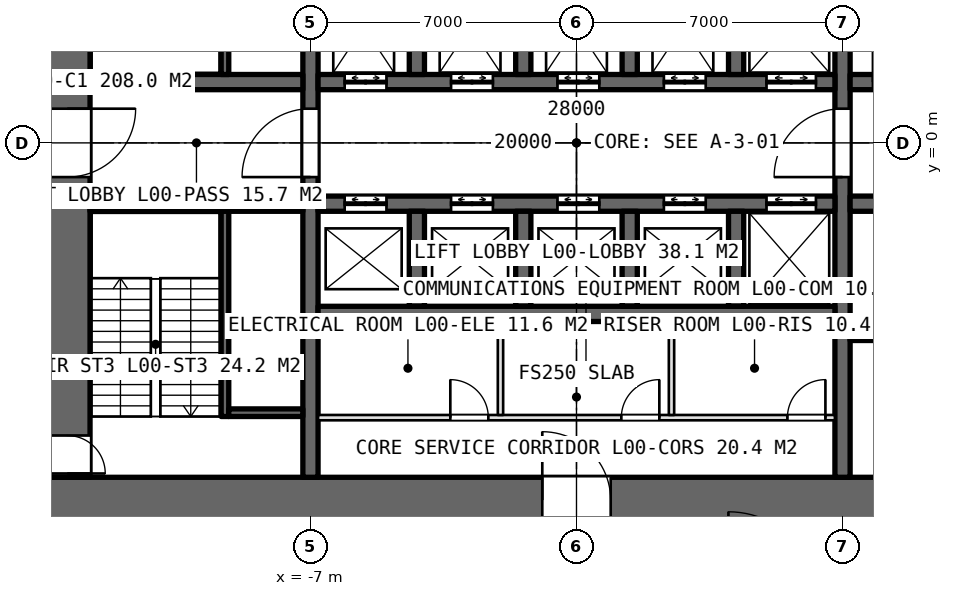
"""IFC4 building model, lengths in metres.
Left out: names, types, materials, properties, quantities, classifications, styles, units other than length and angle.
Written with IfcOpenShell. Run it as: python <this file> out.ifc"""

import sys

from ifc_helpers import new_model, si_unit, direction, frame, frame_2d, origin, place, context, subcontext, project, spatial, rectangle, extrude, element, fill, save


model = new_model("IFC4")
c1 = context("Model", 3, precision=1e-05, world=origin(), true_north=direction((0.0, 1.0)))
c2 = subcontext(c1, "Body", "Model", "MODEL_VIEW")
j1 = project(units=[si_unit("LENGTHUNIT", "METRE"), si_unit("PLANEANGLEUNIT", "RADIAN")], contexts=[c1])
p1 = place(None, origin())
s1 = spatial("IfcSite", under=j1, at=p1, CompositionType="ELEMENT")
p2 = place(p1, origin())
s2 = spatial("IfcBuilding", under=s1, at=p2, CompositionType="ELEMENT")
p3 = place(p2, origin())
s3 = spatial("IfcBuildingStorey", under=s2, at=p3, CompositionType="ELEMENT", Elevation=0.0)
p4 = place(p3, frame((-14.0, -9.4, -0.3), z_axis=(0.0, 0.0, 1.0), x_axis=(1.0, 0.0, 0.0)))
e1 = element("IfcWall", 1, at=p4, inside=s3, PredefinedType="SHEAR", context=c2, shape_type="SweptSolid", body=[
    extrude(rectangle(XDim=28.0, YDim=1.2, at=frame_2d((14.0, 0.0))), origin(), (0.0, 0.0, 1.0), 5.3),
])
p5 = place(p4, frame((13.1, 0.0, 0.3)))
e2 = element("IfcOpeningElement", 2, at=p5, cuts=e1, PredefinedType="OPENING", context=c2, shape_type="SweptSolid", body=[
    extrude(rectangle(XDim=1.8, YDim=2.4, at=frame_2d((0.9, 1.2))), frame((0.0, 0.61, 0.0), z_axis=(0.0, -1.0, 0.0), x_axis=(1.0, 0.0, 0.0)), (0.0, 0.0, 1.0), 1.22),
])
p6 = place(p4, frame((22.9, 0.0, 0.3)))
e3 = element("IfcOpeningElement", 3, at=p6, cuts=e1, PredefinedType="OPENING", context=c2, shape_type="SweptSolid", body=[
    extrude(rectangle(XDim=2.2, YDim=2.7, at=frame_2d((1.1, 1.35))), frame((0.0, 0.61, 0.0), z_axis=(0.0, -1.0, 0.0), x_axis=(1.0, 0.0, 0.0)), (0.0, 0.0, 1.0), 1.22),
])
p7 = place(p3, frame((-13.4, 8.8, -0.3), z_axis=(0.0, 0.0, 1.0), x_axis=(0.0, -1.0, 0.0)))
e4 = element("IfcWall", 4, at=p7, inside=s3, PredefinedType="SHEAR", context=c2, shape_type="SweptSolid", body=[
    extrude(rectangle(XDim=17.6, YDim=1.2, at=frame_2d((8.8, 0.0))), origin(), (0.0, 0.0, 1.0), 5.3),
])
p8 = place(p7, frame((7.9, 0.0, 0.3)))
e5 = element("IfcOpeningElement", 5, at=p8, cuts=e4, PredefinedType="OPENING", context=c2, shape_type="SweptSolid", body=[
    extrude(rectangle(XDim=1.8, YDim=2.4, at=frame_2d((0.9, 1.2))), frame((0.0, 0.61, 0.0), z_axis=(0.0, -1.0, 0.0), x_axis=(1.0, 0.0, 0.0)), (0.0, 0.0, 1.0), 1.22),
])
p9 = place(p7, frame((16.5, 0.0, 0.3)))
e6 = element("IfcOpeningElement", 6, at=p9, cuts=e4, PredefinedType="OPENING", context=c2, shape_type="SweptSolid", body=[
    extrude(rectangle(XDim=1.0, YDim=2.4, at=frame_2d((0.5, 1.2))), frame((0.0, 0.61, 0.0), z_axis=(0.0, -1.0, 0.0), x_axis=(1.0, 0.0, 0.0)), (0.0, 0.0, 1.0), 1.22),
])
p10 = place(p3, frame((-7.0, -8.8, -0.3), z_axis=(0.0, 0.0, 1.0), x_axis=(0.0, 1.0, 0.0)))
e7 = element("IfcWall", 7, at=p10, inside=s3, PredefinedType="SHEAR", context=c2, shape_type="SweptSolid", body=[
    extrude(rectangle(XDim=17.6, YDim=0.4, at=frame_2d((8.8, 0.0))), origin(), (0.0, 0.0, 1.0), 5.3),
])
p11 = place(p10, frame((7.9, 0.0, 0.3)))
e8 = element("IfcOpeningElement", 8, at=p11, cuts=e7, PredefinedType="OPENING", context=c2, shape_type="SweptSolid", body=[
    extrude(rectangle(XDim=1.8, YDim=2.4, at=frame_2d((0.9, 1.2))), frame((0.0, 0.21, 0.0), z_axis=(0.0, -1.0, 0.0), x_axis=(1.0, 0.0, 0.0)), (0.0, 0.0, 1.0), 0.42),
])
p12 = place(p3, frame((7.0, -8.8, -0.3), z_axis=(0.0, 0.0, 1.0), x_axis=(0.0, 1.0, 0.0)))
e9 = element("IfcWall", 9, at=p12, inside=s3, PredefinedType="SHEAR", context=c2, shape_type="SweptSolid", body=[
    extrude(rectangle(XDim=17.6, YDim=0.4, at=frame_2d((8.8, 0.0))), origin(), (0.0, 0.0, 1.0), 5.3),
])
p13 = place(p12, frame((7.9, 0.0, 0.3)))
e10 = element("IfcOpeningElement", 10, at=p13, cuts=e9, PredefinedType="OPENING", context=c2, shape_type="SweptSolid", body=[
    extrude(rectangle(XDim=1.8, YDim=2.4, at=frame_2d((0.9, 1.2))), frame((0.0, 0.21, 0.0), z_axis=(0.0, -1.0, 0.0), x_axis=(1.0, 0.0, 0.0)), (0.0, 0.0, 1.0), 0.42),
])
p14 = place(p3, frame((-6.8, 1.6, -0.3), z_axis=(0.0, 0.0, 1.0), x_axis=(1.0, 0.0, 0.0)))
e11 = element("IfcWall", 11, at=p14, inside=s3, PredefinedType="SHEAR", context=c2, shape_type="SweptSolid", body=[
    extrude(rectangle(XDim=13.6, YDim=0.4, at=frame_2d((6.8, 0.0))), origin(), (0.0, 0.0, 1.0), 5.3),
])
p15 = place(p14, frame((0.7, 0.0, 0.3)))
e12 = element("IfcOpeningElement", 12, at=p15, cuts=e11, PredefinedType="OPENING", context=c2, shape_type="SweptSolid", body=[
    extrude(rectangle(XDim=1.1, YDim=2.4, at=frame_2d((0.55, 1.2))), frame((0.0, 0.21, 0.0), z_axis=(0.0, -1.0, 0.0), x_axis=(1.0, 0.0, 0.0)), (0.0, 0.0, 1.0), 0.42),
])
p16 = place(p14, frame((3.5, 0.0, 0.3)))
e13 = element("IfcOpeningElement", 13, at=p16, cuts=e11, PredefinedType="OPENING", context=c2, shape_type="SweptSolid", body=[
    extrude(rectangle(XDim=1.1, YDim=2.4, at=frame_2d((0.55, 1.2))), frame((0.0, 0.21, 0.0), z_axis=(0.0, -1.0, 0.0), x_axis=(1.0, 0.0, 0.0)), (0.0, 0.0, 1.0), 0.42),
])
p17 = place(p14, frame((6.3, 0.0, 0.3)))
e14 = element("IfcOpeningElement", 14, at=p17, cuts=e11, PredefinedType="OPENING", context=c2, shape_type="SweptSolid", body=[
    extrude(rectangle(XDim=1.1, YDim=2.4, at=frame_2d((0.55, 1.2))), frame((0.0, 0.21, 0.0), z_axis=(0.0, -1.0, 0.0), x_axis=(1.0, 0.0, 0.0)), (0.0, 0.0, 1.0), 0.42),
])
p18 = place(p14, frame((9.1, 0.0, 0.3)))
e15 = element("IfcOpeningElement", 15, at=p18, cuts=e11, PredefinedType="OPENING", context=c2, shape_type="SweptSolid", body=[
    extrude(rectangle(XDim=1.1, YDim=2.4, at=frame_2d((0.55, 1.2))), frame((0.0, 0.21, 0.0), z_axis=(0.0, -1.0, 0.0), x_axis=(1.0, 0.0, 0.0)), (0.0, 0.0, 1.0), 0.42),
])
p19 = place(p14, frame((11.8, 0.0, 0.3)))
e16 = element("IfcOpeningElement", 16, at=p19, cuts=e11, PredefinedType="OPENING", context=c2, shape_type="SweptSolid", body=[
    extrude(rectangle(XDim=1.3, YDim=2.4, at=frame_2d((0.65, 1.2))), frame((0.0, 0.21, 0.0), z_axis=(0.0, -1.0, 0.0), x_axis=(1.0, 0.0, 0.0)), (0.0, 0.0, 1.0), 0.42),
])
p20 = place(p3, frame((-6.8, -1.6, -0.3), z_axis=(0.0, 0.0, 1.0), x_axis=(1.0, 0.0, 0.0)))
e17 = element("IfcWall", 17, at=p20, inside=s3, PredefinedType="SHEAR", context=c2, shape_type="SweptSolid", body=[
    extrude(rectangle(XDim=13.6, YDim=0.4, at=frame_2d((6.8, 0.0))), origin(), (0.0, 0.0, 1.0), 5.3),
])
p21 = place(p20, frame((0.7, 0.0, 0.3)))
e18 = element("IfcOpeningElement", 18, at=p21, cuts=e17, PredefinedType="OPENING", context=c2, shape_type="SweptSolid", body=[
    extrude(rectangle(XDim=1.1, YDim=2.4, at=frame_2d((0.55, 1.2))), frame((0.0, 0.21, 0.0), z_axis=(0.0, -1.0, 0.0), x_axis=(1.0, 0.0, 0.0)), (0.0, 0.0, 1.0), 0.42),
])
p22 = place(p20, frame((3.5, 0.0, 0.3)))
e19 = element("IfcOpeningElement", 19, at=p22, cuts=e17, PredefinedType="OPENING", context=c2, shape_type="SweptSolid", body=[
    extrude(rectangle(XDim=1.1, YDim=2.4, at=frame_2d((0.55, 1.2))), frame((0.0, 0.21, 0.0), z_axis=(0.0, -1.0, 0.0), x_axis=(1.0, 0.0, 0.0)), (0.0, 0.0, 1.0), 0.42),
])
p23 = place(p20, frame((6.3, 0.0, 0.3)))
e20 = element("IfcOpeningElement", 20, at=p23, cuts=e17, PredefinedType="OPENING", context=c2, shape_type="SweptSolid", body=[
    extrude(rectangle(XDim=1.1, YDim=2.4, at=frame_2d((0.55, 1.2))), frame((0.0, 0.21, 0.0), z_axis=(0.0, -1.0, 0.0), x_axis=(1.0, 0.0, 0.0)), (0.0, 0.0, 1.0), 0.42),
])
p24 = place(p20, frame((9.1, 0.0, 0.3)))
e21 = element("IfcOpeningElement", 21, at=p24, cuts=e17, PredefinedType="OPENING", context=c2, shape_type="SweptSolid", body=[
    extrude(rectangle(XDim=1.1, YDim=2.4, at=frame_2d((0.55, 1.2))), frame((0.0, 0.21, 0.0), z_axis=(0.0, -1.0, 0.0), x_axis=(1.0, 0.0, 0.0)), (0.0, 0.0, 1.0), 0.42),
])
p25 = place(p20, frame((11.8, 0.0, 0.3)))
e22 = element("IfcOpeningElement", 22, at=p25, cuts=e17, PredefinedType="OPENING", context=c2, shape_type="SweptSolid", body=[
    extrude(rectangle(XDim=1.3, YDim=2.4, at=frame_2d((0.65, 1.2))), frame((0.0, 0.21, 0.0), z_axis=(0.0, -1.0, 0.0), x_axis=(1.0, 0.0, 0.0)), (0.0, 0.0, 1.0), 0.42),
])
p26 = place(p3, frame((-6.8, -4.5, -0.3), z_axis=(0.0, 0.0, 1.0), x_axis=(1.0, 0.0, 0.0)))
e23 = element("IfcWall", 23, at=p26, inside=s3, PredefinedType="SHEAR", context=c2, shape_type="SweptSolid", body=[
    extrude(rectangle(XDim=13.6, YDim=0.4, at=frame_2d((6.8, 0.0))), origin(), (0.0, 0.0, 1.0), 5.3),
])
for number, where, z_axis, x_axis in (
    (24, (-12.8, 1.6, -0.3), (0.0, 0.0, 1.0), (1.0, 0.0, 0.0)),
    (25, (-12.8, -1.6, -0.3), (0.0, 0.0, 1.0), (1.0, 0.0, 0.0)),
):
    element("IfcWall", number, at=place(p3, frame(where, z_axis=z_axis, x_axis=x_axis)), inside=s3, PredefinedType="SHEAR", context=c2, shape_type="SweptSolid", body=[
        extrude(rectangle(XDim=5.6, YDim=0.4, at=frame_2d((2.8, 0.0))), origin(), (0.0, 0.0, 1.0), 5.3),
    ])
p27 = place(p3, frame((7.2, 1.6, -0.3), z_axis=(0.0, 0.0, 1.0), x_axis=(1.0, 0.0, 0.0)))
e26 = element("IfcWall", 26, at=p27, inside=s3, PredefinedType="SHEAR", context=c2, shape_type="SweptSolid", body=[
    extrude(rectangle(XDim=5.6, YDim=0.4, at=frame_2d((2.8, 0.0))), origin(), (0.0, 0.0, 1.0), 5.3),
])
p28 = place(p27, frame((0.6, 0.0, 0.3)))
e27 = element("IfcOpeningElement", 27, at=p28, cuts=e26, PredefinedType="OPENING", context=c2, shape_type="SweptSolid", body=[
    extrude(rectangle(XDim=1.0, YDim=2.4, at=frame_2d((0.5, 1.2))), frame((0.0, 0.21, 0.0), z_axis=(0.0, -1.0, 0.0), x_axis=(1.0, 0.0, 0.0)), (0.0, 0.0, 1.0), 0.42),
])
p29 = place(p3, frame((7.2, -1.6, -0.3), z_axis=(0.0, 0.0, 1.0), x_axis=(1.0, 0.0, 0.0)))
e28 = element("IfcWall", 28, at=p29, inside=s3, PredefinedType="SHEAR", context=c2, shape_type="SweptSolid", body=[
    extrude(rectangle(XDim=5.6, YDim=0.4, at=frame_2d((2.8, 0.0))), origin(), (0.0, 0.0, 1.0), 5.3),
])
p30 = place(p29, frame((0.9, 0.0, 0.3)))
e29 = element("IfcOpeningElement", 29, at=p30, cuts=e28, PredefinedType="OPENING", context=c2, shape_type="SweptSolid", body=[
    extrude(rectangle(XDim=1.3, YDim=2.4, at=frame_2d((0.65, 1.2))), frame((0.0, 0.21, 0.0), z_axis=(0.0, -1.0, 0.0), x_axis=(1.0, 0.0, 0.0)), (0.0, 0.0, 1.0), 0.42),
])
p31 = place(p29, frame((3.9, 0.0, 0.3)))
e30 = element("IfcOpeningElement", 30, at=p31, cuts=e28, PredefinedType="OPENING", context=c2, shape_type="SweptSolid", body=[
    extrude(rectangle(XDim=1.3, YDim=2.4, at=frame_2d((0.65, 1.2))), frame((0.0, 0.21, 0.0), z_axis=(0.0, -1.0, 0.0), x_axis=(1.0, 0.0, 0.0)), (0.0, 0.0, 1.0), 0.42),
])
p32 = place(p3, frame((7.2, -5.0, -0.3), z_axis=(0.0, 0.0, 1.0), x_axis=(1.0, 0.0, 0.0)))
e31 = element("IfcWall", 31, at=p32, inside=s3, PredefinedType="SHEAR", context=c2, shape_type="SweptSolid", body=[
    extrude(rectangle(XDim=5.6, YDim=0.4, at=frame_2d((2.8, 0.0))), origin(), (0.0, 0.0, 1.0), 5.3),
])
for number, where, z_axis, x_axis in (
    (32, (-4.2, 1.8, -0.3), (0.0, 0.0, 1.0), (0.0, 1.0, 0.0)),
    (33, (-4.2, -4.3, -0.3), (0.0, 0.0, 1.0), (0.0, 1.0, 0.0)),
    (34, (-1.4, 1.8, -0.3), (0.0, 0.0, 1.0), (0.0, 1.0, 0.0)),
    (35, (-1.4, -4.3, -0.3), (0.0, 0.0, 1.0), (0.0, 1.0, 0.0)),
    (36, (1.4, 1.8, -0.3), (0.0, 0.0, 1.0), (0.0, 1.0, 0.0)),
    (37, (1.4, -4.3, -0.3), (0.0, 0.0, 1.0), (0.0, 1.0, 0.0)),
    (38, (4.2, 1.8, -0.3), (0.0, 0.0, 1.0), (0.0, 1.0, 0.0)),
    (39, (4.2, -4.3, -0.3), (0.0, 0.0, 1.0), (0.0, 1.0, 0.0)),
):
    element("IfcWall", number, at=place(p3, frame(where, z_axis=z_axis, x_axis=x_axis)), inside=s3, PredefinedType="SHEAR", context=c2, shape_type="SweptSolid", body=[
        extrude(rectangle(XDim=2.5, YDim=0.4, at=frame_2d((1.25, 0.0))), origin(), (0.0, 0.0, 1.0), 5.3),
    ])
p33 = place(p3, frame((-6.8, -7.23, 0.0), z_axis=(0.0, 0.0, 1.0), x_axis=(1.0, 0.0, 0.0)))
e40 = element("IfcWall", 40, at=p33, inside=s3, PredefinedType="PARTITIONING", context=c2, shape_type="SweptSolid", body=[
    extrude(rectangle(XDim=13.6, YDim=0.14, at=frame_2d((6.8, 0.0))), origin(), (0.0, 0.0, 1.0), 4.75),
])
p34 = place(p33, frame((3.48, 0.0, 0.0)))
e41 = element("IfcOpeningElement", 41, at=p34, cuts=e40, PredefinedType="OPENING", context=c2, shape_type="SweptSolid", body=[
    extrude(rectangle(XDim=1.0, YDim=2.4, at=frame_2d((0.5, 1.2))), frame((0.0, 0.08, 0.0), z_axis=(0.0, -1.0, 0.0), x_axis=(1.0, 0.0, 0.0)), (0.0, 0.0, 1.0), 0.16),
])
p35 = place(p33, frame((7.98, 0.0, 0.0)))
e42 = element("IfcOpeningElement", 42, at=p35, cuts=e40, PredefinedType="OPENING", context=c2, shape_type="SweptSolid", body=[
    extrude(rectangle(XDim=1.0, YDim=2.4, at=frame_2d((0.5, 1.2))), frame((0.0, 0.08, 0.0), z_axis=(0.0, -1.0, 0.0), x_axis=(1.0, 0.0, 0.0)), (0.0, 0.0, 1.0), 0.16),
])
p36 = place(p33, frame((12.35, 0.0, 0.0)))
e43 = element("IfcOpeningElement", 43, at=p36, cuts=e40, PredefinedType="OPENING", context=c2, shape_type="SweptSolid", body=[
    extrude(rectangle(XDim=1.0, YDim=2.4, at=frame_2d((0.5, 1.2))), frame((0.0, 0.08, 0.0), z_axis=(0.0, -1.0, 0.0), x_axis=(1.0, 0.0, 0.0)), (0.0, 0.0, 1.0), 0.16),
])
for number, where, z_axis, x_axis in (
    (44, (-2.0, -4.7, 0.0), (0.0, 0.0, 1.0), (0.0, -1.0, 0.0)),
    (45, (2.5, -4.7, 0.0), (0.0, 0.0, 1.0), (0.0, -1.0, 0.0)),
):
    element("IfcWall", number, at=place(p3, frame(where, z_axis=z_axis, x_axis=x_axis)), inside=s3, PredefinedType="PARTITIONING", context=c2, shape_type="SweptSolid", body=[
        extrude(rectangle(XDim=2.46, YDim=0.14, at=frame_2d((1.23, 0.0))), origin(), (0.0, 0.0, 1.0), 4.75),
    ])
for number, where, z_axis, x_axis in (
    (46, (-9.25, 7.2, -0.3), (0.0, 0.0, 1.0), (0.0, -1.0, 0.0)),
    (47, (-9.25, -7.2, -0.3), (0.0, 0.0, 1.0), (0.0, 1.0, 0.0)),
):
    element("IfcWall", number, at=place(p3, frame(where, z_axis=z_axis, x_axis=x_axis)), inside=s3, PredefinedType="SOLIDWALL", context=c2, shape_type="SweptSolid", body=[
        extrude(rectangle(XDim=5.4, YDim=0.2, at=frame_2d((2.7, 0.0))), origin(), (0.0, 0.0, 1.0), 5.3),
    ])
p37 = place(p3, frame((-9.15, -7.1, -0.3), z_axis=(0.0, 0.0, 1.0), x_axis=(1.0, 0.0, 0.0)))
e48 = element("IfcWall", 48, at=p37, inside=s3, PredefinedType="SOLIDWALL", context=c2, shape_type="SweptSolid", body=[
    extrude(rectangle(XDim=1.95, YDim=0.2, at=frame_2d((0.975, 0.0))), origin(), (0.0, 0.0, 1.0), 5.3),
])
p38 = place(p8, origin())
e49 = element("IfcDoor", 49, at=p38, inside=s3, OperationType="DOUBLE_DOOR_SINGLE_SWING", PredefinedType="DOOR", context=c2, shape_type="SweptSolid", body=[
    extrude(rectangle(XDim=1.8, YDim=2.4, at=frame_2d((0.9, 1.2))), frame((0.0, 0.025, 0.0), z_axis=(0.0, -1.0, 0.0), x_axis=(1.0, 0.0, 0.0)), (0.0, 0.0, 1.0), 0.05),
])
fill(e5, e49)
p39 = place(p11, origin())
e50 = element("IfcDoor", 50, at=p39, inside=s3, OperationType="DOUBLE_DOOR_SINGLE_SWING", PredefinedType="DOOR", context=c2, shape_type="SweptSolid", body=[
    extrude(rectangle(XDim=1.8, YDim=2.4, at=frame_2d((0.9, 1.2))), frame((0.0, 0.025, 0.0), z_axis=(0.0, -1.0, 0.0), x_axis=(1.0, 0.0, 0.0)), (0.0, 0.0, 1.0), 0.05),
])
fill(e8, e50)
p40 = place(p13, origin())
e51 = element("IfcDoor", 51, at=p40, inside=s3, OperationType="DOUBLE_DOOR_SINGLE_SWING", PredefinedType="DOOR", context=c2, shape_type="SweptSolid", body=[
    extrude(rectangle(XDim=1.8, YDim=2.4, at=frame_2d((0.9, 1.2))), frame((0.0, 0.025, 0.0), z_axis=(0.0, -1.0, 0.0), x_axis=(1.0, 0.0, 0.0)), (0.0, 0.0, 1.0), 0.05),
])
fill(e10, e51)
p41 = place(p9, origin())
e52 = element("IfcDoor", 52, at=p41, inside=s3, OperationType="SINGLE_SWING_RIGHT", PredefinedType="DOOR", context=c2, shape_type="SweptSolid", body=[
    extrude(rectangle(XDim=1.0, YDim=2.4, at=frame_2d((0.5, 1.2))), frame((0.0, 0.025, 0.0), z_axis=(0.0, -1.0, 0.0), x_axis=(1.0, 0.0, 0.0)), (0.0, 0.0, 1.0), 0.05),
])
fill(e6, e52)
p42 = place(p34, origin())
e53 = element("IfcDoor", 53, at=p42, inside=s3, OperationType="SINGLE_SWING_LEFT", PredefinedType="DOOR", context=c2, shape_type="SweptSolid", body=[
    extrude(rectangle(XDim=1.0, YDim=2.4, at=frame_2d((0.5, 1.2))), frame((0.0, 0.025, 0.0), z_axis=(0.0, -1.0, 0.0), x_axis=(1.0, 0.0, 0.0)), (0.0, 0.0, 1.0), 0.05),
])
fill(e41, e53)
p43 = place(p35, origin())
e54 = element("IfcDoor", 54, at=p43, inside=s3, OperationType="SINGLE_SWING_RIGHT", PredefinedType="DOOR", context=c2, shape_type="SweptSolid", body=[
    extrude(rectangle(XDim=1.0, YDim=2.4, at=frame_2d((0.5, 1.2))), frame((0.0, 0.025, 0.0), z_axis=(0.0, -1.0, 0.0), x_axis=(1.0, 0.0, 0.0)), (0.0, 0.0, 1.0), 0.05),
])
fill(e42, e54)
p44 = place(p36, origin())
e55 = element("IfcDoor", 55, at=p44, inside=s3, OperationType="SINGLE_SWING_RIGHT", PredefinedType="DOOR", context=c2, shape_type="SweptSolid", body=[
    extrude(rectangle(XDim=1.0, YDim=2.4, at=frame_2d((0.5, 1.2))), frame((0.0, 0.025, 0.0), z_axis=(0.0, -1.0, 0.0), x_axis=(1.0, 0.0, 0.0)), (0.0, 0.0, 1.0), 0.05),
])
fill(e43, e55)
p45 = place(p5, origin())
e56 = element("IfcDoor", 56, at=p45, inside=s3, OperationType="DOUBLE_DOOR_SINGLE_SWING", PredefinedType="DOOR", context=c2, shape_type="SweptSolid", body=[
    extrude(rectangle(XDim=1.8, YDim=2.4, at=frame_2d((0.9, 1.2))), frame((0.0, 0.025, 0.0), z_axis=(0.0, -1.0, 0.0), x_axis=(1.0, 0.0, 0.0)), (0.0, 0.0, 1.0), 0.05),
])
fill(e2, e56)
p46 = place(p15, origin())
e57 = element("IfcDoor", 57, at=p46, inside=s3, OperationType="DOUBLE_DOOR_SLIDING", PredefinedType="DOOR", context=c2, shape_type="SweptSolid", body=[
    extrude(rectangle(XDim=1.1, YDim=2.4, at=frame_2d((0.55, 1.2))), frame((0.0, 0.025, 0.0), z_axis=(0.0, -1.0, 0.0), x_axis=(1.0, 0.0, 0.0)), (0.0, 0.0, 1.0), 0.05),
])
fill(e12, e57)
p47 = place(p21, origin())
e58 = element("IfcDoor", 58, at=p47, inside=s3, OperationType="DOUBLE_DOOR_SLIDING", PredefinedType="DOOR", context=c2, shape_type="SweptSolid", body=[
    extrude(rectangle(XDim=1.1, YDim=2.4, at=frame_2d((0.55, 1.2))), frame((0.0, 0.025, 0.0), z_axis=(0.0, -1.0, 0.0), x_axis=(1.0, 0.0, 0.0)), (0.0, 0.0, 1.0), 0.05),
])
fill(e18, e58)
p48 = place(p16, origin())
e59 = element("IfcDoor", 59, at=p48, inside=s3, OperationType="DOUBLE_DOOR_SLIDING", PredefinedType="DOOR", context=c2, shape_type="SweptSolid", body=[
    extrude(rectangle(XDim=1.1, YDim=2.4, at=frame_2d((0.55, 1.2))), frame((0.0, 0.025, 0.0), z_axis=(0.0, -1.0, 0.0), x_axis=(1.0, 0.0, 0.0)), (0.0, 0.0, 1.0), 0.05),
])
fill(e13, e59)
p49 = place(p22, origin())
e60 = element("IfcDoor", 60, at=p49, inside=s3, OperationType="DOUBLE_DOOR_SLIDING", PredefinedType="DOOR", context=c2, shape_type="SweptSolid", body=[
    extrude(rectangle(XDim=1.1, YDim=2.4, at=frame_2d((0.55, 1.2))), frame((0.0, 0.025, 0.0), z_axis=(0.0, -1.0, 0.0), x_axis=(1.0, 0.0, 0.0)), (0.0, 0.0, 1.0), 0.05),
])
fill(e19, e60)
p50 = place(p17, origin())
e61 = element("IfcDoor", 61, at=p50, inside=s3, OperationType="DOUBLE_DOOR_SLIDING", PredefinedType="DOOR", context=c2, shape_type="SweptSolid", body=[
    extrude(rectangle(XDim=1.1, YDim=2.4, at=frame_2d((0.55, 1.2))), frame((0.0, 0.025, 0.0), z_axis=(0.0, -1.0, 0.0), x_axis=(1.0, 0.0, 0.0)), (0.0, 0.0, 1.0), 0.05),
])
fill(e14, e61)
p51 = place(p23, origin())
e62 = element("IfcDoor", 62, at=p51, inside=s3, OperationType="DOUBLE_DOOR_SLIDING", PredefinedType="DOOR", context=c2, shape_type="SweptSolid", body=[
    extrude(rectangle(XDim=1.1, YDim=2.4, at=frame_2d((0.55, 1.2))), frame((0.0, 0.025, 0.0), z_axis=(0.0, -1.0, 0.0), x_axis=(1.0, 0.0, 0.0)), (0.0, 0.0, 1.0), 0.05),
])
fill(e20, e62)
p52 = place(p18, origin())
e63 = element("IfcDoor", 63, at=p52, inside=s3, OperationType="DOUBLE_DOOR_SLIDING", PredefinedType="DOOR", context=c2, shape_type="SweptSolid", body=[
    extrude(rectangle(XDim=1.1, YDim=2.4, at=frame_2d((0.55, 1.2))), frame((0.0, 0.025, 0.0), z_axis=(0.0, -1.0, 0.0), x_axis=(1.0, 0.0, 0.0)), (0.0, 0.0, 1.0), 0.05),
])
fill(e15, e63)
p53 = place(p24, origin())
e64 = element("IfcDoor", 64, at=p53, inside=s3, OperationType="DOUBLE_DOOR_SLIDING", PredefinedType="DOOR", context=c2, shape_type="SweptSolid", body=[
    extrude(rectangle(XDim=1.1, YDim=2.4, at=frame_2d((0.55, 1.2))), frame((0.0, 0.025, 0.0), z_axis=(0.0, -1.0, 0.0), x_axis=(1.0, 0.0, 0.0)), (0.0, 0.0, 1.0), 0.05),
])
fill(e21, e64)
p54 = place(p19, origin())
e65 = element("IfcDoor", 65, at=p54, inside=s3, OperationType="DOUBLE_DOOR_SLIDING", PredefinedType="DOOR", context=c2, shape_type="SweptSolid", body=[
    extrude(rectangle(XDim=1.3, YDim=2.4, at=frame_2d((0.65, 1.2))), frame((0.0, 0.025, 0.0), z_axis=(0.0, -1.0, 0.0), x_axis=(1.0, 0.0, 0.0)), (0.0, 0.0, 1.0), 0.05),
])
fill(e16, e65)
p55 = place(p25, origin())
e66 = element("IfcDoor", 66, at=p55, inside=s3, OperationType="DOUBLE_DOOR_SLIDING", PredefinedType="DOOR", context=c2, shape_type="SweptSolid", body=[
    extrude(rectangle(XDim=1.3, YDim=2.4, at=frame_2d((0.65, 1.2))), frame((0.0, 0.025, 0.0), z_axis=(0.0, -1.0, 0.0), x_axis=(1.0, 0.0, 0.0)), (0.0, 0.0, 1.0), 0.05),
])
fill(e22, e66)
save(model, sys.argv[1])
